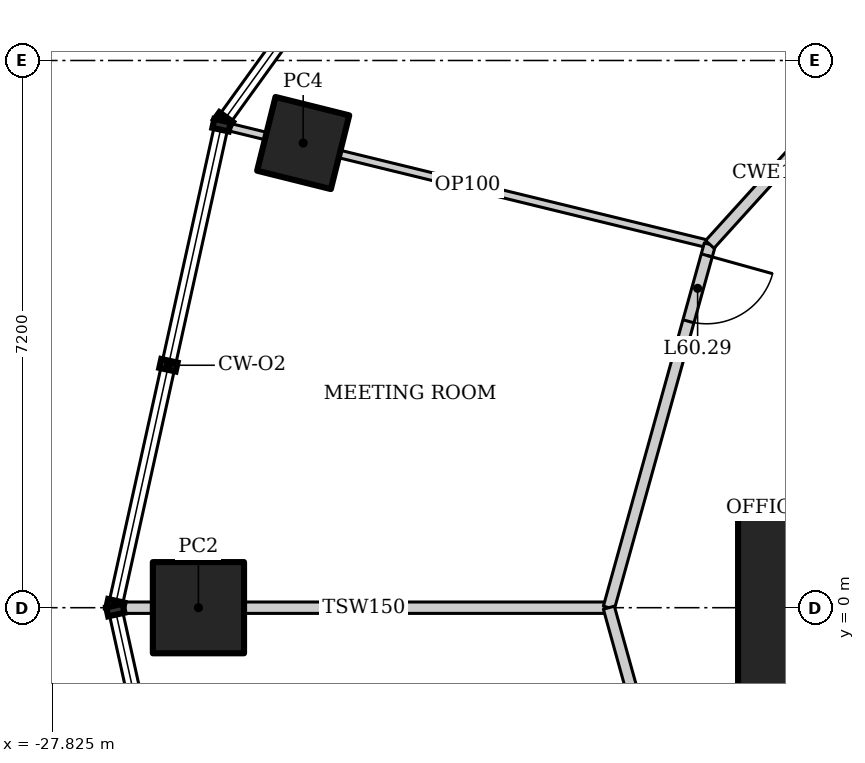
"""IFC4 building model, lengths in metres.
Left out: names, types, materials, properties, quantities, classifications, styles, units other than length and angle.
Written with IfcOpenShell. Run it as: python <this file> out.ifc"""

import sys

from ifc_helpers import new_model, si_unit, direction, frame, frame_2d, origin, origin_2d, place, context, subcontext, project, spatial, rectangle, hollow_rectangle, extrude, element, fill, save


model = new_model("IFC4")
c1 = context("Model", 3, precision=1e-05, world=origin(), true_north=direction((0.0, 1.0)))
c2 = subcontext(c1, "Body", "Model", "MODEL_VIEW")
j1 = project(units=[si_unit("LENGTHUNIT", "METRE"), si_unit("PLANEANGLEUNIT", "RADIAN")], contexts=[c1])
p1 = place(None, origin())
s1 = spatial("IfcSite", under=j1, at=p1, CompositionType="ELEMENT")
p2 = place(p1, origin())
s2 = spatial("IfcBuilding", under=s1, at=p2, CompositionType="ELEMENT")
p3 = place(p2, frame((0.0, 0.0, 257.8)))
s3 = spatial("IfcBuildingStorey", under=s2, at=p3, CompositionType="ELEMENT", Elevation=257.8)
p4 = place(p3, frame((-17.5, 0.0, 0.0), z_axis=(0.0, 0.0, 1.0), x_axis=(1.0, 0.0, 0.0)))
e1 = element("IfcColumn", 1, at=p4, inside=s3, PredefinedType="COLUMN", context=c2, shape_type="SweptSolid", body=[
    extrude(hollow_rectangle(XDim=2.6, YDim=2.6, WallThickness=0.13, at=origin_2d()), origin(), (0.0, 0.0, 1.0), 4.2),
])
p5 = place(p3, frame((-24.522, 6.114, 0.0), z_axis=(0.0, 0.0, 1.0), x_axis=(0.2419218956, 0.970295726276, 0.0)))
e2 = element("IfcColumn", 2, at=p5, inside=s3, PredefinedType="COLUMN", context=c2, shape_type="SweptSolid", body=[
    extrude(hollow_rectangle(XDim=1.0, YDim=1.0, WallThickness=0.08, at=origin_2d()), origin(), (0.0, 0.0, 1.0), 4.2),
])
p6 = place(p3, frame((-25.9, 0.0, 0.0), z_axis=(0.0, 0.0, 1.0), x_axis=(1.0, 0.0, 0.0)))
e3 = element("IfcColumn", 3, at=p6, inside=s3, PredefinedType="COLUMN", context=c2, shape_type="SweptSolid", body=[
    extrude(hollow_rectangle(XDim=1.2, YDim=1.2, WallThickness=0.1, at=origin_2d()), origin(), (0.0, 0.0, 1.0), 4.2),
])
p7 = place(p3, frame((-25.543, 6.335, 0.0), z_axis=(0.0, 0.0, 1.0), x_axis=(0.971467850621, -0.237171278215, 0.0)))
e4 = element("IfcWall", 4, at=p7, inside=s3, PredefinedType="PARTITIONING", context=c2, shape_type="SweptSolid", body=[
    extrude(rectangle(XDim=6.558, YDim=0.1, at=frame_2d((3.279, 0.0))), origin(), (0.0, 0.0, 1.0), 3.108),
])
p8 = place(p3, frame((-26.944, 0.0, 0.0), z_axis=(0.0, 0.0, 1.0), x_axis=(1.0, 0.0, 0.0)))
e5 = element("IfcWall", 5, at=p8, inside=s3, PredefinedType="PARTITIONING", context=c2, shape_type="SweptSolid", body=[
    extrude(rectangle(XDim=6.444, YDim=0.15, at=frame_2d((3.222, 0.0))), origin(), (0.0, 0.0, 1.0), 3.349),
])
p9 = place(p3, frame((-19.172, 4.78, 0.0), z_axis=(0.0, 0.0, 1.0), x_axis=(-0.26770731566, -0.963500281859, 0.0)))
e6 = element("IfcWall", 6, at=p9, inside=s3, PredefinedType="PARTITIONING", context=c2, shape_type="SweptSolid", body=[
    extrude(rectangle(XDim=4.961, YDim=0.15, at=frame_2d((2.48, 0.0))), origin(), (0.0, 0.0, 1.0), 4.05),
])
p10 = place(p9, frame((0.15, 0.0, 0.0)))
e7 = element("IfcOpeningElement", 7, at=p10, cuts=e6, PredefinedType="OPENING", context=c2, shape_type="SweptSolid", body=[
    extrude(rectangle(XDim=0.9, YDim=2.1, at=frame_2d((0.45, 1.05))), frame((0.0, 0.085, 0.0), z_axis=(0.0, -1.0, 0.0), x_axis=(1.0, 0.0, 0.0)), (0.0, 0.0, 1.0), 0.17),
])
p11 = place(p3, frame((-20.5, 0.0, 0.0), z_axis=(0.0, 0.0, 1.0), x_axis=(0.26770731566, -0.963500281859, 0.0)))
e8 = element("IfcWall", 8, at=p11, inside=s3, PredefinedType="PARTITIONING", context=c2, shape_type="SweptSolid", body=[
    extrude(rectangle(XDim=4.961, YDim=0.15, at=frame_2d((2.48, 0.0))), origin(), (0.0, 0.0, 1.0), 4.05),
])
p12 = place(p3, frame((-17.463, 6.665, 0.0), z_axis=(0.0, 0.0, 1.0), x_axis=(-0.671721890643, -0.74080341632, 0.0)))
e9 = element("IfcWall", 9, at=p12, inside=s3, PredefinedType="PARTITIONING", context=c2, shape_type="SweptSolid", body=[
    extrude(rectangle(XDim=2.544, YDim=0.15, at=frame_2d((1.272, 0.0))), origin(), (0.0, 0.0, 1.0), 4.05),
])
p13 = place(p10, origin())
e10 = element("IfcDoor", 10, at=p13, inside=s3, OperationType="SINGLE_SWING_LEFT", PredefinedType="DOOR", context=c2, shape_type="SweptSolid", body=[
    extrude(rectangle(XDim=0.9, YDim=2.1, at=frame_2d((0.45, 1.05))), frame((0.0, 0.025, 0.0), z_axis=(0.0, -1.0, 0.0), x_axis=(1.0, 0.0, 0.0)), (0.0, 0.0, 1.0), 0.05),
])
fill(e7, e10)
save(model, sys.argv[1])
